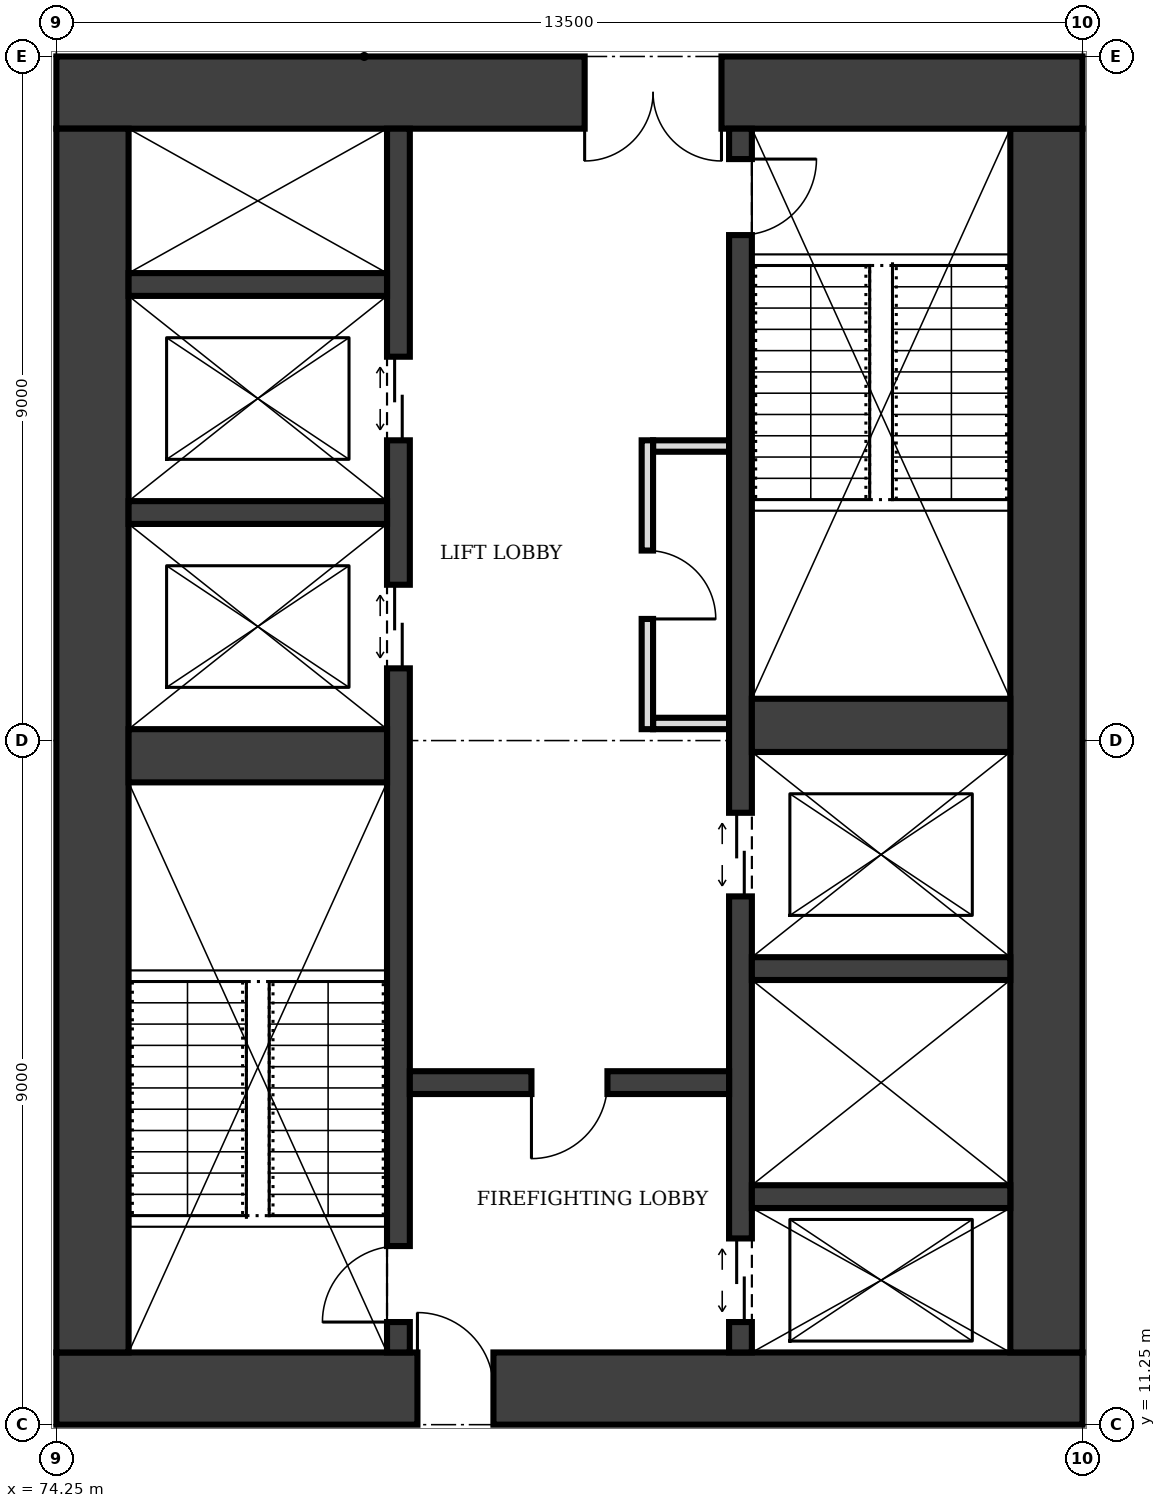
"""IFC4 building model, lengths in metres.
Left out: names, types, materials, properties, quantities, classifications, styles, units other than length and angle.
Written with IfcOpenShell. Run it as: python <this file> out.ifc"""

import sys

from ifc_helpers import new_model, si_unit, direction, frame, frame_2d, origin, place, context, subcontext, project, spatial, rectangle, extrude, element, fill, save


model = new_model("IFC4")
c1 = context("Model", 3, precision=1e-05, world=origin(), true_north=direction((0.0, 1.0)))
c2 = subcontext(c1, "Body", "Model", "MODEL_VIEW")
j1 = project(units=[si_unit("LENGTHUNIT", "METRE"), si_unit("PLANEANGLEUNIT", "RADIAN")], contexts=[c1])
p1 = place(None, origin())
s1 = spatial("IfcSite", under=j1, at=p1, CompositionType="ELEMENT")
p2 = place(p1, origin())
s2 = spatial("IfcBuilding", under=s1, at=p2, CompositionType="ELEMENT")
p3 = place(p2, frame((0.0, 0.0, 57.0)))
s3 = spatial("IfcBuildingStorey", under=s2, at=p3, CompositionType="ELEMENT", Elevation=57.0)
p4 = place(p3, frame((74.25, 11.725, 0.0), z_axis=(0.0, 0.0, 1.0), x_axis=(1.0, 0.0, 0.0)))
e1 = element("IfcWall", 1, at=p4, inside=s3, PredefinedType="SHEAR", context=c2, shape_type="SweptSolid", body=[
    extrude(rectangle(XDim=13.5, YDim=0.95, at=frame_2d((6.75, 0.0))), origin(), (0.0, 0.0, 1.0), 4.0),
])
p5 = place(p4, frame((4.75, 0.0, 0.0)))
e2 = element("IfcOpeningElement", 2, at=p5, cuts=e1, PredefinedType="OPENING", context=c2, shape_type="SweptSolid", body=[
    extrude(rectangle(XDim=1.0, YDim=2.1, at=frame_2d((0.5, 1.05))), frame((0.0, 0.485, 0.0), z_axis=(0.0, -1.0, 0.0), x_axis=(1.0, 0.0, 0.0)), (0.0, 0.0, 1.0), 0.97),
])
p6 = place(p3, frame((87.275, 12.2, 0.0), z_axis=(0.0, 0.0, 1.0), x_axis=(0.0, 1.0, 0.0)))
e3 = element("IfcWall", 3, at=p6, inside=s3, PredefinedType="SHEAR", context=c2, shape_type="SweptSolid", body=[
    extrude(rectangle(XDim=16.1, YDim=0.95, at=frame_2d((8.05, 0.0))), origin(), (0.0, 0.0, 1.0), 4.0),
])
p7 = place(p3, frame((87.75, 28.775, 0.0), z_axis=(0.0, 0.0, 1.0), x_axis=(-1.0, 0.0, 0.0)))
e4 = element("IfcWall", 4, at=p7, inside=s3, PredefinedType="SHEAR", context=c2, shape_type="SweptSolid", body=[
    extrude(rectangle(XDim=13.5, YDim=0.95, at=frame_2d((6.75, 0.0))), origin(), (0.0, 0.0, 1.0), 4.0),
])
p8 = place(p7, frame((4.75, 0.0, 0.0)))
e5 = element("IfcOpeningElement", 5, at=p8, cuts=e4, PredefinedType="OPENING", context=c2, shape_type="SweptSolid", body=[
    extrude(rectangle(XDim=1.8, YDim=2.1, at=frame_2d((0.9, 1.05))), frame((0.0, 0.485, 0.0), z_axis=(0.0, -1.0, 0.0), x_axis=(1.0, 0.0, 0.0)), (0.0, 0.0, 1.0), 0.97),
])
p9 = place(p3, frame((74.725, 28.3, 0.0), z_axis=(0.0, 0.0, 1.0), x_axis=(0.0, -1.0, 0.0)))
e6 = element("IfcWall", 6, at=p9, inside=s3, PredefinedType="SHEAR", context=c2, shape_type="SweptSolid", body=[
    extrude(rectangle(XDim=16.1, YDim=0.95, at=frame_2d((8.05, 0.0))), origin(), (0.0, 0.0, 1.0), 4.0),
])
p10 = place(p3, frame((78.75, 12.2, 0.0), z_axis=(0.0, 0.0, 1.0), x_axis=(0.0, 1.0, 0.0)))
e7 = element("IfcWall", 7, at=p10, inside=s3, PredefinedType="SHEAR", context=c2, shape_type="SweptSolid", body=[
    extrude(rectangle(XDim=16.1, YDim=0.3, at=frame_2d((8.05, 0.0))), origin(), (0.0, 0.0, 1.0), 4.0),
])
p11 = place(p10, frame((0.4, 0.0, 0.0)))
e8 = element("IfcOpeningElement", 8, at=p11, cuts=e7, PredefinedType="OPENING", context=c2, shape_type="SweptSolid", body=[
    extrude(rectangle(XDim=1.0, YDim=2.1, at=frame_2d((0.5, 1.05))), frame((0.0, 0.16, 0.0), z_axis=(0.0, -1.0, 0.0), x_axis=(1.0, 0.0, 0.0)), (0.0, 0.0, 1.0), 0.32),
])
p12 = place(p10, frame((9.0, 0.0, 0.0)))
e9 = element("IfcOpeningElement", 9, at=p12, cuts=e7, PredefinedType="OPENING", context=c2, shape_type="SweptSolid", body=[
    extrude(rectangle(XDim=1.1, YDim=2.1, at=frame_2d((0.55, 1.05))), frame((0.0, 0.16, 0.0), z_axis=(0.0, -1.0, 0.0), x_axis=(1.0, 0.0, 0.0)), (0.0, 0.0, 1.0), 0.32),
])
p13 = place(p10, frame((12.0, 0.0, 0.0)))
e10 = element("IfcOpeningElement", 10, at=p13, cuts=e7, PredefinedType="OPENING", context=c2, shape_type="SweptSolid", body=[
    extrude(rectangle(XDim=1.1, YDim=2.1, at=frame_2d((0.55, 1.05))), frame((0.0, 0.16, 0.0), z_axis=(0.0, -1.0, 0.0), x_axis=(1.0, 0.0, 0.0)), (0.0, 0.0, 1.0), 0.32),
])
p14 = place(p3, frame((83.25, 12.2, 0.0), z_axis=(0.0, 0.0, 1.0), x_axis=(0.0, 1.0, 0.0)))
e11 = element("IfcWall", 11, at=p14, inside=s3, PredefinedType="SHEAR", context=c2, shape_type="SweptSolid", body=[
    extrude(rectangle(XDim=16.1, YDim=0.3, at=frame_2d((8.05, 0.0))), origin(), (0.0, 0.0, 1.0), 4.0),
])
p15 = place(p14, frame((14.7, 0.0, 0.0)))
e12 = element("IfcOpeningElement", 12, at=p15, cuts=e11, PredefinedType="OPENING", context=c2, shape_type="SweptSolid", body=[
    extrude(rectangle(XDim=1.0, YDim=2.1, at=frame_2d((0.5, 1.05))), frame((0.0, 0.16, 0.0), z_axis=(0.0, -1.0, 0.0), x_axis=(1.0, 0.0, 0.0)), (0.0, 0.0, 1.0), 0.32),
])
p16 = place(p14, frame((0.4, 0.0, 0.0)))
e13 = element("IfcOpeningElement", 13, at=p16, cuts=e11, PredefinedType="OPENING", context=c2, shape_type="SweptSolid", body=[
    extrude(rectangle(XDim=1.1, YDim=2.1, at=frame_2d((0.55, 1.05))), frame((0.0, 0.16, 0.0), z_axis=(0.0, -1.0, 0.0), x_axis=(1.0, 0.0, 0.0)), (0.0, 0.0, 1.0), 0.32),
])
p17 = place(p14, frame((6.0, 0.0, 0.0)))
e14 = element("IfcOpeningElement", 14, at=p17, cuts=e11, PredefinedType="OPENING", context=c2, shape_type="SweptSolid", body=[
    extrude(rectangle(XDim=1.1, YDim=2.1, at=frame_2d((0.55, 1.05))), frame((0.0, 0.16, 0.0), z_axis=(0.0, -1.0, 0.0), x_axis=(1.0, 0.0, 0.0)), (0.0, 0.0, 1.0), 0.32),
])
p18 = place(p3, frame((75.2, 20.05, 0.0), z_axis=(0.0, 0.0, 1.0), x_axis=(1.0, 0.0, 0.0)))
e15 = element("IfcWall", 15, at=p18, inside=s3, PredefinedType="SHEAR", context=c2, shape_type="SweptSolid", body=[
    extrude(rectangle(XDim=3.4, YDim=0.7, at=frame_2d((1.7, 0.0))), origin(), (0.0, 0.0, 1.0), 4.0),
])
p19 = place(p3, frame((78.9, 15.75, 0.0), z_axis=(0.0, 0.0, 1.0), x_axis=(1.0, 0.0, 0.0)))
e16 = element("IfcWall", 16, at=p19, inside=s3, PredefinedType="SHEAR", context=c2, shape_type="SweptSolid", body=[
    extrude(rectangle(XDim=4.2, YDim=0.3, at=frame_2d((2.1, 0.0))), origin(), (0.0, 0.0, 1.0), 4.0),
])
p20 = place(p19, frame((1.6, 0.0, 0.0)))
e17 = element("IfcOpeningElement", 17, at=p20, cuts=e16, PredefinedType="OPENING", context=c2, shape_type="SweptSolid", body=[
    extrude(rectangle(XDim=1.0, YDim=2.1, at=frame_2d((0.5, 1.05))), frame((0.0, 0.16, 0.0), z_axis=(0.0, -1.0, 0.0), x_axis=(1.0, 0.0, 0.0)), (0.0, 0.0, 1.0), 0.32),
])
for number, where, z_axis, x_axis in (
    (18, (83.4, 14.25, 0.0), (0.0, 0.0, 1.0), (1.0, 0.0, 0.0)),
    (19, (83.4, 17.25, 0.0), (0.0, 0.0, 1.0), (1.0, 0.0, 0.0)),
):
    element("IfcWall", number, at=place(p3, frame(where, z_axis=z_axis, x_axis=x_axis)), inside=s3, PredefinedType="SHEAR", context=c2, shape_type="SweptSolid", body=[
        extrude(rectangle(XDim=3.4, YDim=0.3, at=frame_2d((1.7, 0.0))), origin(), (0.0, 0.0, 1.0), 4.0),
    ])
p21 = place(p3, frame((83.4, 20.45, 0.0), z_axis=(0.0, 0.0, 1.0), x_axis=(1.0, 0.0, 0.0)))
e20 = element("IfcWall", 20, at=p21, inside=s3, PredefinedType="SHEAR", context=c2, shape_type="SweptSolid", body=[
    extrude(rectangle(XDim=3.4, YDim=0.7, at=frame_2d((1.7, 0.0))), origin(), (0.0, 0.0, 1.0), 4.0),
])
for number, where, z_axis, x_axis in (
    (21, (75.2, 23.25, 0.0), (0.0, 0.0, 1.0), (1.0, 0.0, 0.0)),
    (22, (75.2, 26.25, 0.0), (0.0, 0.0, 1.0), (1.0, 0.0, 0.0)),
):
    element("IfcWall", number, at=place(p3, frame(where, z_axis=z_axis, x_axis=x_axis)), inside=s3, PredefinedType="SHEAR", context=c2, shape_type="SweptSolid", body=[
        extrude(rectangle(XDim=3.4, YDim=0.3, at=frame_2d((1.7, 0.0))), origin(), (0.0, 0.0, 1.0), 4.0),
    ])
p22 = place(p3, frame((82.025, 20.4, 0.0), z_axis=(0.0, 0.0, 1.0), x_axis=(0.0, 1.0, 0.0)))
e23 = element("IfcWall", 23, at=p22, inside=s3, PredefinedType="PARTITIONING", context=c2, shape_type="SweptSolid", body=[
    extrude(rectangle(XDim=3.8, YDim=0.15, at=frame_2d((1.9, 0.0))), origin(), (0.0, 0.0, 1.0), 3.75),
])
p23 = place(p22, frame((1.45, 0.0, 0.0)))
e24 = element("IfcOpeningElement", 24, at=p23, cuts=e23, PredefinedType="OPENING", context=c2, shape_type="SweptSolid", body=[
    extrude(rectangle(XDim=0.9, YDim=2.1, at=frame_2d((0.45, 1.05))), frame((0.0, 0.085, 0.0), z_axis=(0.0, -1.0, 0.0), x_axis=(1.0, 0.0, 0.0)), (0.0, 0.0, 1.0), 0.17),
])
for number, where, z_axis, x_axis in (
    (25, (82.1, 20.475, 0.0), (0.0, 0.0, 1.0), (1.0, 0.0, 0.0)),
    (26, (82.1, 24.125, 0.0), (0.0, 0.0, 1.0), (1.0, 0.0, 0.0)),
):
    element("IfcWall", number, at=place(p3, frame(where, z_axis=z_axis, x_axis=x_axis)), inside=s3, PredefinedType="PARTITIONING", context=c2, shape_type="SweptSolid", body=[
        extrude(rectangle(XDim=1.0, YDim=0.15, at=frame_2d((0.5, 0.0))), origin(), (0.0, 0.0, 1.0), 3.75),
    ])
p24 = place(p5, origin())
e27 = element("IfcDoor", 27, at=p24, inside=s3, OperationType="SINGLE_SWING_LEFT", PredefinedType="DOOR", context=c2, shape_type="SweptSolid", body=[
    extrude(rectangle(XDim=1.0, YDim=2.1, at=frame_2d((0.5, 1.05))), frame((0.0, 0.025, 0.0), z_axis=(0.0, -1.0, 0.0), x_axis=(1.0, 0.0, 0.0)), (0.0, 0.0, 1.0), 0.05),
])
fill(e2, e27)
p25 = place(p8, origin())
e28 = element("IfcDoor", 28, at=p25, inside=s3, OperationType="DOUBLE_DOOR_SINGLE_SWING", PredefinedType="DOOR", context=c2, shape_type="SweptSolid", body=[
    extrude(rectangle(XDim=1.8, YDim=2.1, at=frame_2d((0.9, 1.05))), frame((0.0, 0.025, 0.0), z_axis=(0.0, -1.0, 0.0), x_axis=(1.0, 0.0, 0.0)), (0.0, 0.0, 1.0), 0.05),
])
fill(e5, e28)
p26 = place(p20, frame((1.0, 0.0, 0.0), z_axis=(0.0, 0.0, 1.0), x_axis=(-1.0, 0.0, 0.0)))
e29 = element("IfcDoor", 29, at=p26, inside=s3, OperationType="SINGLE_SWING_RIGHT", PredefinedType="DOOR", context=c2, shape_type="SweptSolid", body=[
    extrude(rectangle(XDim=1.0, YDim=2.1, at=frame_2d((0.5, 1.05))), frame((0.0, 0.025, 0.0), z_axis=(0.0, -1.0, 0.0), x_axis=(1.0, 0.0, 0.0)), (0.0, 0.0, 1.0), 0.05),
])
fill(e17, e29)
p27 = place(p11, origin())
e30 = element("IfcDoor", 30, at=p27, inside=s3, OperationType="SINGLE_SWING_LEFT", PredefinedType="DOOR", context=c2, shape_type="SweptSolid", body=[
    extrude(rectangle(XDim=1.0, YDim=2.1, at=frame_2d((0.5, 1.05))), frame((0.0, 0.025, 0.0), z_axis=(0.0, -1.0, 0.0), x_axis=(1.0, 0.0, 0.0)), (0.0, 0.0, 1.0), 0.05),
])
fill(e8, e30)
p28 = place(p15, frame((1.0, 0.0, 0.0), z_axis=(0.0, 0.0, 1.0), x_axis=(-1.0, 0.0, 0.0)))
e31 = element("IfcDoor", 31, at=p28, inside=s3, OperationType="SINGLE_SWING_LEFT", PredefinedType="DOOR", context=c2, shape_type="SweptSolid", body=[
    extrude(rectangle(XDim=1.0, YDim=2.1, at=frame_2d((0.5, 1.05))), frame((0.0, 0.025, 0.0), z_axis=(0.0, -1.0, 0.0), x_axis=(1.0, 0.0, 0.0)), (0.0, 0.0, 1.0), 0.05),
])
fill(e12, e31)
p29 = place(p16, origin())
e32 = element("IfcDoor", 32, at=p29, inside=s3, OperationType="DOUBLE_DOOR_SLIDING", PredefinedType="DOOR", context=c2, shape_type="SweptSolid", body=[
    extrude(rectangle(XDim=1.1, YDim=2.1, at=frame_2d((0.55, 1.05))), frame((0.0, 0.025, 0.0), z_axis=(0.0, -1.0, 0.0), x_axis=(1.0, 0.0, 0.0)), (0.0, 0.0, 1.0), 0.05),
])
fill(e13, e32)
p30 = place(p12, origin())
e33 = element("IfcDoor", 33, at=p30, inside=s3, OperationType="DOUBLE_DOOR_SLIDING", PredefinedType="DOOR", context=c2, shape_type="SweptSolid", body=[
    extrude(rectangle(XDim=1.1, YDim=2.1, at=frame_2d((0.55, 1.05))), frame((0.0, 0.025, 0.0), z_axis=(0.0, -1.0, 0.0), x_axis=(1.0, 0.0, 0.0)), (0.0, 0.0, 1.0), 0.05),
])
fill(e9, e33)
p31 = place(p13, origin())
e34 = element("IfcDoor", 34, at=p31, inside=s3, OperationType="DOUBLE_DOOR_SLIDING", PredefinedType="DOOR", context=c2, shape_type="SweptSolid", body=[
    extrude(rectangle(XDim=1.1, YDim=2.1, at=frame_2d((0.55, 1.05))), frame((0.0, 0.025, 0.0), z_axis=(0.0, -1.0, 0.0), x_axis=(1.0, 0.0, 0.0)), (0.0, 0.0, 1.0), 0.05),
])
fill(e10, e34)
p32 = place(p17, origin())
e35 = element("IfcDoor", 35, at=p32, inside=s3, OperationType="DOUBLE_DOOR_SLIDING", PredefinedType="DOOR", context=c2, shape_type="SweptSolid", body=[
    extrude(rectangle(XDim=1.1, YDim=2.1, at=frame_2d((0.55, 1.05))), frame((0.0, 0.025, 0.0), z_axis=(0.0, -1.0, 0.0), x_axis=(1.0, 0.0, 0.0)), (0.0, 0.0, 1.0), 0.05),
])
fill(e14, e35)
p33 = place(p23, frame((0.9, 0.0, 0.0), z_axis=(0.0, 0.0, 1.0), x_axis=(-1.0, 0.0, 0.0)))
e36 = element("IfcDoor", 36, at=p33, inside=s3, OperationType="SINGLE_SWING_RIGHT", PredefinedType="DOOR", context=c2, shape_type="SweptSolid", body=[
    extrude(rectangle(XDim=0.9, YDim=2.1, at=frame_2d((0.45, 1.05))), frame((0.0, 0.025, 0.0), z_axis=(0.0, -1.0, 0.0), x_axis=(1.0, 0.0, 0.0)), (0.0, 0.0, 1.0), 0.05),
])
fill(e24, e36)
save(model, sys.argv[1])
